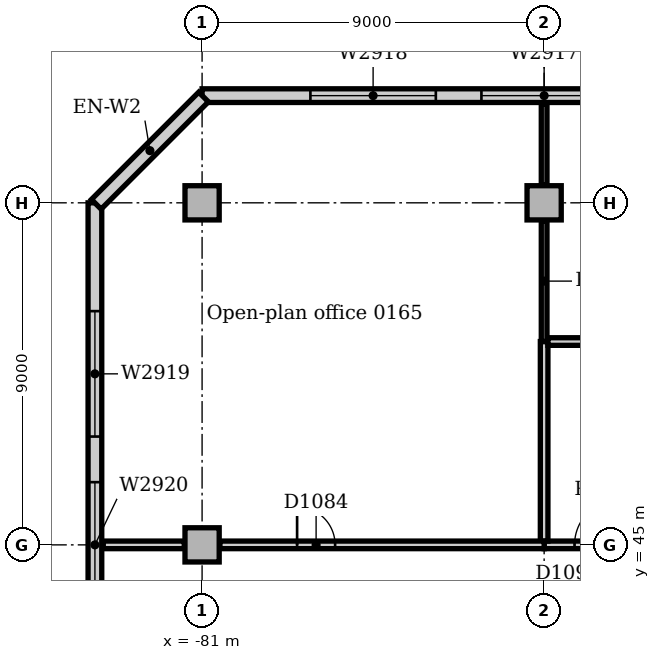
"""IFC4 building model, lengths in metres.
Left out: names, types, materials, properties, quantities, classifications, styles, units other than length and angle.
Written with IfcOpenShell. Run it as: python <this file> out.ifc"""

import sys

from ifc_helpers import new_model, si_unit, direction, frame, frame_2d, origin, origin_2d, place, context, subcontext, project, spatial, rectangle, extrude, element, fill, save


model = new_model("IFC4")
c1 = context("Model", 3, precision=1e-05, world=origin(), true_north=direction((0.0, 1.0)))
c2 = subcontext(c1, "Body", "Model", "MODEL_VIEW")
j1 = project(units=[si_unit("LENGTHUNIT", "METRE"), si_unit("PLANEANGLEUNIT", "RADIAN")], contexts=[c1])
p1 = place(None, origin())
s1 = spatial("IfcSite", under=j1, at=p1, CompositionType="ELEMENT")
p2 = place(p1, origin())
s2 = spatial("IfcBuilding", under=s1, at=p2, CompositionType="ELEMENT")
p3 = place(p2, frame((0.0, 0.0, 6.0)))
s3 = spatial("IfcBuildingStorey", under=s2, at=p3, CompositionType="ELEMENT", Elevation=6.0)
for number, where, z_axis, x_axis in (
    (1, (-81.0, 45.0, 0.0), (0.0, 0.0, 1.0), (1.0, 0.0, 0.0)),
    (2, (-81.0, 54.0, 0.0), (0.0, 0.0, 1.0), (1.0, 0.0, 0.0)),
    (3, (-72.0, 54.0, 0.0), (0.0, 0.0, 1.0), (1.0, 0.0, 0.0)),
):
    element("IfcColumn", number, at=place(p3, frame(where, z_axis=z_axis, x_axis=x_axis)), inside=s3, PredefinedType="COLUMN", context=c2, shape_type="SweptSolid", body=[
        extrude(rectangle(XDim=0.9, YDim=0.9, at=origin_2d()), origin(), (0.0, 0.0, 1.0), 4.7),
    ])
p4 = place(p3, frame((63.0, 56.82, 0.0), z_axis=(0.0, 0.0, 1.0), x_axis=(-1.0, 0.0, 0.0)))
e4 = element("IfcWall", 4, at=p4, inside=s3, PredefinedType="STANDARD", context=c2, shape_type="SweptSolid", body=[
    extrude(rectangle(XDim=144.0, YDim=0.36, at=frame_2d((72.0, 0.0))), origin(), (0.0, 0.0, 1.0), 4.7),
])
p5 = place(p4, frame((2.85, 0.0, 0.9)))
e5 = element("IfcOpeningElement", 5, at=p5, cuts=e4, PredefinedType="OPENING", context=c2, shape_type="SweptSolid", body=[
    extrude(rectangle(XDim=3.3, YDim=2.4, at=frame_2d((1.65, 1.2))), frame((0.0, 0.19, 0.0), z_axis=(0.0, -1.0, 0.0), x_axis=(1.0, 0.0, 0.0)), (0.0, 0.0, 1.0), 0.38),
])
p6 = place(p4, frame((7.35, 0.0, 0.9)))
e6 = element("IfcOpeningElement", 6, at=p6, cuts=e4, PredefinedType="OPENING", context=c2, shape_type="SweptSolid", body=[
    extrude(rectangle(XDim=3.3, YDim=2.4, at=frame_2d((1.65, 1.2))), frame((0.0, 0.19, 0.0), z_axis=(0.0, -1.0, 0.0), x_axis=(1.0, 0.0, 0.0)), (0.0, 0.0, 1.0), 0.38),
])
p7 = place(p4, frame((11.85, 0.0, 0.9)))
e7 = element("IfcOpeningElement", 7, at=p7, cuts=e4, PredefinedType="OPENING", context=c2, shape_type="SweptSolid", body=[
    extrude(rectangle(XDim=3.3, YDim=2.4, at=frame_2d((1.65, 1.2))), frame((0.0, 0.19, 0.0), z_axis=(0.0, -1.0, 0.0), x_axis=(1.0, 0.0, 0.0)), (0.0, 0.0, 1.0), 0.38),
])
p8 = place(p4, frame((16.35, 0.0, 0.9)))
e8 = element("IfcOpeningElement", 8, at=p8, cuts=e4, PredefinedType="OPENING", context=c2, shape_type="SweptSolid", body=[
    extrude(rectangle(XDim=3.3, YDim=2.4, at=frame_2d((1.65, 1.2))), frame((0.0, 0.19, 0.0), z_axis=(0.0, -1.0, 0.0), x_axis=(1.0, 0.0, 0.0)), (0.0, 0.0, 1.0), 0.38),
])
p9 = place(p4, frame((20.85, 0.0, 0.9)))
e9 = element("IfcOpeningElement", 9, at=p9, cuts=e4, PredefinedType="OPENING", context=c2, shape_type="SweptSolid", body=[
    extrude(rectangle(XDim=3.3, YDim=2.4, at=frame_2d((1.65, 1.2))), frame((0.0, 0.19, 0.0), z_axis=(0.0, -1.0, 0.0), x_axis=(1.0, 0.0, 0.0)), (0.0, 0.0, 1.0), 0.38),
])
p10 = place(p4, frame((25.35, 0.0, 0.9)))
e10 = element("IfcOpeningElement", 10, at=p10, cuts=e4, PredefinedType="OPENING", context=c2, shape_type="SweptSolid", body=[
    extrude(rectangle(XDim=3.3, YDim=2.4, at=frame_2d((1.65, 1.2))), frame((0.0, 0.19, 0.0), z_axis=(0.0, -1.0, 0.0), x_axis=(1.0, 0.0, 0.0)), (0.0, 0.0, 1.0), 0.38),
])
p11 = place(p4, frame((29.85, 0.0, 0.9)))
e11 = element("IfcOpeningElement", 11, at=p11, cuts=e4, PredefinedType="OPENING", context=c2, shape_type="SweptSolid", body=[
    extrude(rectangle(XDim=3.3, YDim=2.4, at=frame_2d((1.65, 1.2))), frame((0.0, 0.19, 0.0), z_axis=(0.0, -1.0, 0.0), x_axis=(1.0, 0.0, 0.0)), (0.0, 0.0, 1.0), 0.38),
])
p12 = place(p4, frame((34.35, 0.0, 0.9)))
e12 = element("IfcOpeningElement", 12, at=p12, cuts=e4, PredefinedType="OPENING", context=c2, shape_type="SweptSolid", body=[
    extrude(rectangle(XDim=3.3, YDim=2.4, at=frame_2d((1.65, 1.2))), frame((0.0, 0.19, 0.0), z_axis=(0.0, -1.0, 0.0), x_axis=(1.0, 0.0, 0.0)), (0.0, 0.0, 1.0), 0.38),
])
p13 = place(p4, frame((38.85, 0.0, 0.9)))
e13 = element("IfcOpeningElement", 13, at=p13, cuts=e4, PredefinedType="OPENING", context=c2, shape_type="SweptSolid", body=[
    extrude(rectangle(XDim=3.3, YDim=2.4, at=frame_2d((1.65, 1.2))), frame((0.0, 0.19, 0.0), z_axis=(0.0, -1.0, 0.0), x_axis=(1.0, 0.0, 0.0)), (0.0, 0.0, 1.0), 0.38),
])
p14 = place(p4, frame((43.35, 0.0, 0.9)))
e14 = element("IfcOpeningElement", 14, at=p14, cuts=e4, PredefinedType="OPENING", context=c2, shape_type="SweptSolid", body=[
    extrude(rectangle(XDim=3.3, YDim=2.4, at=frame_2d((1.65, 1.2))), frame((0.0, 0.19, 0.0), z_axis=(0.0, -1.0, 0.0), x_axis=(1.0, 0.0, 0.0)), (0.0, 0.0, 1.0), 0.38),
])
p15 = place(p4, frame((47.85, 0.0, 0.9)))
e15 = element("IfcOpeningElement", 15, at=p15, cuts=e4, PredefinedType="OPENING", context=c2, shape_type="SweptSolid", body=[
    extrude(rectangle(XDim=3.3, YDim=2.4, at=frame_2d((1.65, 1.2))), frame((0.0, 0.19, 0.0), z_axis=(0.0, -1.0, 0.0), x_axis=(1.0, 0.0, 0.0)), (0.0, 0.0, 1.0), 0.38),
])
p16 = place(p4, frame((52.35, 0.0, 0.9)))
e16 = element("IfcOpeningElement", 16, at=p16, cuts=e4, PredefinedType="OPENING", context=c2, shape_type="SweptSolid", body=[
    extrude(rectangle(XDim=3.3, YDim=2.4, at=frame_2d((1.65, 1.2))), frame((0.0, 0.19, 0.0), z_axis=(0.0, -1.0, 0.0), x_axis=(1.0, 0.0, 0.0)), (0.0, 0.0, 1.0), 0.38),
])
p17 = place(p4, frame((56.85, 0.0, 0.9)))
e17 = element("IfcOpeningElement", 17, at=p17, cuts=e4, PredefinedType="OPENING", context=c2, shape_type="SweptSolid", body=[
    extrude(rectangle(XDim=3.3, YDim=2.4, at=frame_2d((1.65, 1.2))), frame((0.0, 0.19, 0.0), z_axis=(0.0, -1.0, 0.0), x_axis=(1.0, 0.0, 0.0)), (0.0, 0.0, 1.0), 0.38),
])
p18 = place(p4, frame((61.35, 0.0, 0.9)))
e18 = element("IfcOpeningElement", 18, at=p18, cuts=e4, PredefinedType="OPENING", context=c2, shape_type="SweptSolid", body=[
    extrude(rectangle(XDim=3.3, YDim=2.4, at=frame_2d((1.65, 1.2))), frame((0.0, 0.19, 0.0), z_axis=(0.0, -1.0, 0.0), x_axis=(1.0, 0.0, 0.0)), (0.0, 0.0, 1.0), 0.38),
])
p19 = place(p4, frame((65.85, 0.0, 0.9)))
e19 = element("IfcOpeningElement", 19, at=p19, cuts=e4, PredefinedType="OPENING", context=c2, shape_type="SweptSolid", body=[
    extrude(rectangle(XDim=3.3, YDim=2.4, at=frame_2d((1.65, 1.2))), frame((0.0, 0.19, 0.0), z_axis=(0.0, -1.0, 0.0), x_axis=(1.0, 0.0, 0.0)), (0.0, 0.0, 1.0), 0.38),
])
p20 = place(p4, frame((70.35, 0.0, 0.9)))
e20 = element("IfcOpeningElement", 20, at=p20, cuts=e4, PredefinedType="OPENING", context=c2, shape_type="SweptSolid", body=[
    extrude(rectangle(XDim=3.3, YDim=2.4, at=frame_2d((1.65, 1.2))), frame((0.0, 0.19, 0.0), z_axis=(0.0, -1.0, 0.0), x_axis=(1.0, 0.0, 0.0)), (0.0, 0.0, 1.0), 0.38),
])
p21 = place(p4, frame((74.85, 0.0, 0.9)))
e21 = element("IfcOpeningElement", 21, at=p21, cuts=e4, PredefinedType="OPENING", context=c2, shape_type="SweptSolid", body=[
    extrude(rectangle(XDim=3.3, YDim=2.4, at=frame_2d((1.65, 1.2))), frame((0.0, 0.19, 0.0), z_axis=(0.0, -1.0, 0.0), x_axis=(1.0, 0.0, 0.0)), (0.0, 0.0, 1.0), 0.38),
])
p22 = place(p4, frame((79.35, 0.0, 0.9)))
e22 = element("IfcOpeningElement", 22, at=p22, cuts=e4, PredefinedType="OPENING", context=c2, shape_type="SweptSolid", body=[
    extrude(rectangle(XDim=3.3, YDim=2.4, at=frame_2d((1.65, 1.2))), frame((0.0, 0.19, 0.0), z_axis=(0.0, -1.0, 0.0), x_axis=(1.0, 0.0, 0.0)), (0.0, 0.0, 1.0), 0.38),
])
p23 = place(p4, frame((83.85, 0.0, 0.9)))
e23 = element("IfcOpeningElement", 23, at=p23, cuts=e4, PredefinedType="OPENING", context=c2, shape_type="SweptSolid", body=[
    extrude(rectangle(XDim=3.3, YDim=2.4, at=frame_2d((1.65, 1.2))), frame((0.0, 0.19, 0.0), z_axis=(0.0, -1.0, 0.0), x_axis=(1.0, 0.0, 0.0)), (0.0, 0.0, 1.0), 0.38),
])
p24 = place(p4, frame((88.35, 0.0, 0.9)))
e24 = element("IfcOpeningElement", 24, at=p24, cuts=e4, PredefinedType="OPENING", context=c2, shape_type="SweptSolid", body=[
    extrude(rectangle(XDim=3.3, YDim=2.4, at=frame_2d((1.65, 1.2))), frame((0.0, 0.19, 0.0), z_axis=(0.0, -1.0, 0.0), x_axis=(1.0, 0.0, 0.0)), (0.0, 0.0, 1.0), 0.38),
])
p25 = place(p4, frame((92.85, 0.0, 0.9)))
e25 = element("IfcOpeningElement", 25, at=p25, cuts=e4, PredefinedType="OPENING", context=c2, shape_type="SweptSolid", body=[
    extrude(rectangle(XDim=3.3, YDim=2.4, at=frame_2d((1.65, 1.2))), frame((0.0, 0.19, 0.0), z_axis=(0.0, -1.0, 0.0), x_axis=(1.0, 0.0, 0.0)), (0.0, 0.0, 1.0), 0.38),
])
p26 = place(p4, frame((97.35, 0.0, 0.9)))
e26 = element("IfcOpeningElement", 26, at=p26, cuts=e4, PredefinedType="OPENING", context=c2, shape_type="SweptSolid", body=[
    extrude(rectangle(XDim=3.3, YDim=2.4, at=frame_2d((1.65, 1.2))), frame((0.0, 0.19, 0.0), z_axis=(0.0, -1.0, 0.0), x_axis=(1.0, 0.0, 0.0)), (0.0, 0.0, 1.0), 0.38),
])
p27 = place(p4, frame((101.85, 0.0, 0.9)))
e27 = element("IfcOpeningElement", 27, at=p27, cuts=e4, PredefinedType="OPENING", context=c2, shape_type="SweptSolid", body=[
    extrude(rectangle(XDim=3.3, YDim=2.4, at=frame_2d((1.65, 1.2))), frame((0.0, 0.19, 0.0), z_axis=(0.0, -1.0, 0.0), x_axis=(1.0, 0.0, 0.0)), (0.0, 0.0, 1.0), 0.38),
])
p28 = place(p4, frame((106.35, 0.0, 0.9)))
e28 = element("IfcOpeningElement", 28, at=p28, cuts=e4, PredefinedType="OPENING", context=c2, shape_type="SweptSolid", body=[
    extrude(rectangle(XDim=3.3, YDim=2.4, at=frame_2d((1.65, 1.2))), frame((0.0, 0.19, 0.0), z_axis=(0.0, -1.0, 0.0), x_axis=(1.0, 0.0, 0.0)), (0.0, 0.0, 1.0), 0.38),
])
p29 = place(p4, frame((110.85, 0.0, 0.9)))
e29 = element("IfcOpeningElement", 29, at=p29, cuts=e4, PredefinedType="OPENING", context=c2, shape_type="SweptSolid", body=[
    extrude(rectangle(XDim=3.3, YDim=2.4, at=frame_2d((1.65, 1.2))), frame((0.0, 0.19, 0.0), z_axis=(0.0, -1.0, 0.0), x_axis=(1.0, 0.0, 0.0)), (0.0, 0.0, 1.0), 0.38),
])
p30 = place(p4, frame((115.35, 0.0, 0.9)))
e30 = element("IfcOpeningElement", 30, at=p30, cuts=e4, PredefinedType="OPENING", context=c2, shape_type="SweptSolid", body=[
    extrude(rectangle(XDim=3.3, YDim=2.4, at=frame_2d((1.65, 1.2))), frame((0.0, 0.19, 0.0), z_axis=(0.0, -1.0, 0.0), x_axis=(1.0, 0.0, 0.0)), (0.0, 0.0, 1.0), 0.38),
])
p31 = place(p4, frame((119.85, 0.0, 0.9)))
e31 = element("IfcOpeningElement", 31, at=p31, cuts=e4, PredefinedType="OPENING", context=c2, shape_type="SweptSolid", body=[
    extrude(rectangle(XDim=3.3, YDim=2.4, at=frame_2d((1.65, 1.2))), frame((0.0, 0.19, 0.0), z_axis=(0.0, -1.0, 0.0), x_axis=(1.0, 0.0, 0.0)), (0.0, 0.0, 1.0), 0.38),
])
p32 = place(p4, frame((124.35, 0.0, 0.9)))
e32 = element("IfcOpeningElement", 32, at=p32, cuts=e4, PredefinedType="OPENING", context=c2, shape_type="SweptSolid", body=[
    extrude(rectangle(XDim=3.3, YDim=2.4, at=frame_2d((1.65, 1.2))), frame((0.0, 0.19, 0.0), z_axis=(0.0, -1.0, 0.0), x_axis=(1.0, 0.0, 0.0)), (0.0, 0.0, 1.0), 0.38),
])
p33 = place(p4, frame((128.85, 0.0, 0.9)))
e33 = element("IfcOpeningElement", 33, at=p33, cuts=e4, PredefinedType="OPENING", context=c2, shape_type="SweptSolid", body=[
    extrude(rectangle(XDim=3.3, YDim=2.4, at=frame_2d((1.65, 1.2))), frame((0.0, 0.19, 0.0), z_axis=(0.0, -1.0, 0.0), x_axis=(1.0, 0.0, 0.0)), (0.0, 0.0, 1.0), 0.38),
])
p34 = place(p4, frame((133.35, 0.0, 0.9)))
e34 = element("IfcOpeningElement", 34, at=p34, cuts=e4, PredefinedType="OPENING", context=c2, shape_type="SweptSolid", body=[
    extrude(rectangle(XDim=3.3, YDim=2.4, at=frame_2d((1.65, 1.2))), frame((0.0, 0.19, 0.0), z_axis=(0.0, -1.0, 0.0), x_axis=(1.0, 0.0, 0.0)), (0.0, 0.0, 1.0), 0.38),
])
p35 = place(p4, frame((137.85, 0.0, 0.9)))
e35 = element("IfcOpeningElement", 35, at=p35, cuts=e4, PredefinedType="OPENING", context=c2, shape_type="SweptSolid", body=[
    extrude(rectangle(XDim=3.3, YDim=2.4, at=frame_2d((1.65, 1.2))), frame((0.0, 0.19, 0.0), z_axis=(0.0, -1.0, 0.0), x_axis=(1.0, 0.0, 0.0)), (0.0, 0.0, 1.0), 0.38),
])
p36 = place(p3, frame((-83.82, 54.0, 0.0), z_axis=(0.0, 0.0, 1.0), x_axis=(0.0, -1.0, 0.0)))
e36 = element("IfcWall", 36, at=p36, inside=s3, PredefinedType="STANDARD", context=c2, shape_type="SweptSolid", body=[
    extrude(rectangle(XDim=63.0, YDim=0.36, at=frame_2d((31.5, 0.0))), origin(), (0.0, 0.0, 1.0), 4.7),
])
p37 = place(p36, frame((2.85, 0.0, 0.9)))
e37 = element("IfcOpeningElement", 37, at=p37, cuts=e36, PredefinedType="OPENING", context=c2, shape_type="SweptSolid", body=[
    extrude(rectangle(XDim=3.3, YDim=2.4, at=frame_2d((1.65, 1.2))), frame((0.0, 0.19, 0.0), z_axis=(0.0, -1.0, 0.0), x_axis=(1.0, 0.0, 0.0)), (0.0, 0.0, 1.0), 0.38),
])
p38 = place(p36, frame((7.35, 0.0, 0.9)))
e38 = element("IfcOpeningElement", 38, at=p38, cuts=e36, PredefinedType="OPENING", context=c2, shape_type="SweptSolid", body=[
    extrude(rectangle(XDim=3.3, YDim=2.4, at=frame_2d((1.65, 1.2))), frame((0.0, 0.19, 0.0), z_axis=(0.0, -1.0, 0.0), x_axis=(1.0, 0.0, 0.0)), (0.0, 0.0, 1.0), 0.38),
])
p39 = place(p36, frame((11.85, 0.0, 0.9)))
e39 = element("IfcOpeningElement", 39, at=p39, cuts=e36, PredefinedType="OPENING", context=c2, shape_type="SweptSolid", body=[
    extrude(rectangle(XDim=3.3, YDim=2.4, at=frame_2d((1.65, 1.2))), frame((0.0, 0.19, 0.0), z_axis=(0.0, -1.0, 0.0), x_axis=(1.0, 0.0, 0.0)), (0.0, 0.0, 1.0), 0.38),
])
p40 = place(p36, frame((16.35, 0.0, 0.9)))
e40 = element("IfcOpeningElement", 40, at=p40, cuts=e36, PredefinedType="OPENING", context=c2, shape_type="SweptSolid", body=[
    extrude(rectangle(XDim=3.3, YDim=2.4, at=frame_2d((1.65, 1.2))), frame((0.0, 0.19, 0.0), z_axis=(0.0, -1.0, 0.0), x_axis=(1.0, 0.0, 0.0)), (0.0, 0.0, 1.0), 0.38),
])
p41 = place(p36, frame((20.85, 0.0, 0.9)))
e41 = element("IfcOpeningElement", 41, at=p41, cuts=e36, PredefinedType="OPENING", context=c2, shape_type="SweptSolid", body=[
    extrude(rectangle(XDim=3.3, YDim=2.4, at=frame_2d((1.65, 1.2))), frame((0.0, 0.19, 0.0), z_axis=(0.0, -1.0, 0.0), x_axis=(1.0, 0.0, 0.0)), (0.0, 0.0, 1.0), 0.38),
])
p42 = place(p36, frame((25.35, 0.0, 0.9)))
e42 = element("IfcOpeningElement", 42, at=p42, cuts=e36, PredefinedType="OPENING", context=c2, shape_type="SweptSolid", body=[
    extrude(rectangle(XDim=3.3, YDim=2.4, at=frame_2d((1.65, 1.2))), frame((0.0, 0.19, 0.0), z_axis=(0.0, -1.0, 0.0), x_axis=(1.0, 0.0, 0.0)), (0.0, 0.0, 1.0), 0.38),
])
p43 = place(p36, frame((29.85, 0.0, 0.9)))
e43 = element("IfcOpeningElement", 43, at=p43, cuts=e36, PredefinedType="OPENING", context=c2, shape_type="SweptSolid", body=[
    extrude(rectangle(XDim=3.3, YDim=2.4, at=frame_2d((1.65, 1.2))), frame((0.0, 0.19, 0.0), z_axis=(0.0, -1.0, 0.0), x_axis=(1.0, 0.0, 0.0)), (0.0, 0.0, 1.0), 0.38),
])
p44 = place(p36, frame((34.35, 0.0, 0.9)))
e44 = element("IfcOpeningElement", 44, at=p44, cuts=e36, PredefinedType="OPENING", context=c2, shape_type="SweptSolid", body=[
    extrude(rectangle(XDim=3.3, YDim=2.4, at=frame_2d((1.65, 1.2))), frame((0.0, 0.19, 0.0), z_axis=(0.0, -1.0, 0.0), x_axis=(1.0, 0.0, 0.0)), (0.0, 0.0, 1.0), 0.38),
])
p45 = place(p36, frame((38.85, 0.0, 0.9)))
e45 = element("IfcOpeningElement", 45, at=p45, cuts=e36, PredefinedType="OPENING", context=c2, shape_type="SweptSolid", body=[
    extrude(rectangle(XDim=3.3, YDim=2.4, at=frame_2d((1.65, 1.2))), frame((0.0, 0.19, 0.0), z_axis=(0.0, -1.0, 0.0), x_axis=(1.0, 0.0, 0.0)), (0.0, 0.0, 1.0), 0.38),
])
p46 = place(p36, frame((43.35, 0.0, 0.9)))
e46 = element("IfcOpeningElement", 46, at=p46, cuts=e36, PredefinedType="OPENING", context=c2, shape_type="SweptSolid", body=[
    extrude(rectangle(XDim=3.3, YDim=2.4, at=frame_2d((1.65, 1.2))), frame((0.0, 0.19, 0.0), z_axis=(0.0, -1.0, 0.0), x_axis=(1.0, 0.0, 0.0)), (0.0, 0.0, 1.0), 0.38),
])
p47 = place(p36, frame((47.85, 0.0, 0.9)))
e47 = element("IfcOpeningElement", 47, at=p47, cuts=e36, PredefinedType="OPENING", context=c2, shape_type="SweptSolid", body=[
    extrude(rectangle(XDim=3.3, YDim=2.4, at=frame_2d((1.65, 1.2))), frame((0.0, 0.19, 0.0), z_axis=(0.0, -1.0, 0.0), x_axis=(1.0, 0.0, 0.0)), (0.0, 0.0, 1.0), 0.38),
])
p48 = place(p36, frame((52.35, 0.0, 0.9)))
e48 = element("IfcOpeningElement", 48, at=p48, cuts=e36, PredefinedType="OPENING", context=c2, shape_type="SweptSolid", body=[
    extrude(rectangle(XDim=3.3, YDim=2.4, at=frame_2d((1.65, 1.2))), frame((0.0, 0.19, 0.0), z_axis=(0.0, -1.0, 0.0), x_axis=(1.0, 0.0, 0.0)), (0.0, 0.0, 1.0), 0.38),
])
p49 = place(p36, frame((56.85, 0.0, 0.9)))
e49 = element("IfcOpeningElement", 49, at=p49, cuts=e36, PredefinedType="OPENING", context=c2, shape_type="SweptSolid", body=[
    extrude(rectangle(XDim=3.3, YDim=2.4, at=frame_2d((1.65, 1.2))), frame((0.0, 0.19, 0.0), z_axis=(0.0, -1.0, 0.0), x_axis=(1.0, 0.0, 0.0)), (0.0, 0.0, 1.0), 0.38),
])
p50 = place(p3, frame((-80.961, 56.784, 0.0), z_axis=(0.0, 0.0, 1.0), x_axis=(-0.707106781187, -0.707106781187, 0.0)))
e50 = element("IfcWall", 50, at=p50, inside=s3, PredefinedType="STANDARD", context=c2, shape_type="SweptSolid", body=[
    extrude(rectangle(XDim=3.993, YDim=0.36, at=frame_2d((1.996, 0.0))), origin(), (0.0, 0.0, 1.0), 4.7),
])
p51 = place(p3, frame((-72.0, 45.0, 0.0), z_axis=(0.0, 0.0, 1.0), x_axis=(1.0, 0.0, 0.0)))
e51 = element("IfcWall", 51, at=p51, inside=s3, PredefinedType="SOLIDWALL", context=c2, shape_type="SweptSolid", body=[
    extrude(rectangle(XDim=9.0, YDim=0.2, at=frame_2d((4.5, 0.0))), origin(), (0.0, 0.0, 1.0), 4.7),
])
p52 = place(p51, frame((0.8, 0.0, 0.0)))
e52 = element("IfcOpeningElement", 52, at=p52, cuts=e51, PredefinedType="OPENING", context=c2, shape_type="SweptSolid", body=[
    extrude(rectangle(XDim=1.2, YDim=2.1, at=frame_2d((0.6, 1.05))), frame((0.0, 0.11, 0.0), z_axis=(0.0, -1.0, 0.0), x_axis=(1.0, 0.0, 0.0)), (0.0, 0.0, 1.0), 0.22),
])
p53 = place(p3, frame((-72.0, 45.1, 0.0), z_axis=(0.0, 0.0, 1.0), x_axis=(0.0, 1.0, 0.0)))
e53 = element("IfcWall", 53, at=p53, inside=s3, PredefinedType="SOLIDWALL", context=c2, shape_type="SweptSolid", body=[
    extrude(rectangle(XDim=5.25, YDim=0.2, at=frame_2d((2.625, 0.0))), origin(), (0.0, 0.0, 1.0), 4.7),
])
p54 = place(p3, frame((-71.9, 50.35, 0.0), z_axis=(0.0, 0.0, 1.0), x_axis=(1.0, 0.0, 0.0)))
e54 = element("IfcWall", 54, at=p54, inside=s3, PredefinedType="SOLIDWALL", context=c2, shape_type="SweptSolid", body=[
    extrude(rectangle(XDim=9.0, YDim=0.2, at=frame_2d((4.5, 0.0))), origin(), (0.0, 0.0, 1.0), 4.7),
])
p55 = place(p3, frame((-83.6, 45.0, 0.0), z_axis=(0.0, 0.0, 1.0), x_axis=(1.0, 0.0, 0.0)))
e55 = element("IfcWall", 55, at=p55, inside=s3, PredefinedType="PARTITIONING", context=c2, shape_type="SweptSolid", body=[
    extrude(rectangle(XDim=2.13, YDim=0.2, at=frame_2d((1.065, 0.0))), origin(), (0.0, 0.0, 1.0), 4.7),
])
p56 = place(p3, frame((-80.53, 45.0, 0.0), z_axis=(0.0, 0.0, 1.0), x_axis=(1.0, 0.0, 0.0)))
e56 = element("IfcWall", 56, at=p56, inside=s3, PredefinedType="PARTITIONING", context=c2, shape_type="SweptSolid", body=[
    extrude(rectangle(XDim=8.53, YDim=0.2, at=frame_2d((4.265, 0.0))), origin(), (0.0, 0.0, 1.0), 4.7),
])
p57 = place(p56, frame((2.03, 0.0, 0.0)))
e57 = element("IfcOpeningElement", 57, at=p57, cuts=e56, PredefinedType="OPENING", context=c2, shape_type="SweptSolid", body=[
    extrude(rectangle(XDim=1.0, YDim=2.1, at=frame_2d((0.5, 1.05))), frame((0.0, 0.11, 0.0), z_axis=(0.0, -1.0, 0.0), x_axis=(1.0, 0.0, 0.0)), (0.0, 0.0, 1.0), 0.22),
])
p58 = place(p3, frame((-72.0, 50.35, 0.0), z_axis=(0.0, 0.0, 1.0), x_axis=(0.0, 1.0, 0.0)))
e58 = element("IfcWall", 58, at=p58, inside=s3, PredefinedType="PARTITIONING", context=c2, shape_type="SweptSolid", body=[
    extrude(rectangle(XDim=3.18, YDim=0.15, at=frame_2d((1.59, 0.0))), origin(), (0.0, 0.0, 1.0), 4.7),
])
p59 = place(p3, frame((-72.0, 54.47, 0.0), z_axis=(0.0, 0.0, 1.0), x_axis=(0.0, 1.0, 0.0)))
e59 = element("IfcWall", 59, at=p59, inside=s3, PredefinedType="PARTITIONING", context=c2, shape_type="SweptSolid", body=[
    extrude(rectangle(XDim=2.13, YDim=0.15, at=frame_2d((1.065, 0.0))), origin(), (0.0, 0.0, 1.0), 4.7),
])
p60 = place(p34, origin())
e60 = element("IfcWindow", 60, at=p60, inside=s3, PartitioningType="SINGLE_PANEL", PredefinedType="WINDOW", context=c2, shape_type="SweptSolid", body=[
    extrude(rectangle(XDim=3.3, YDim=2.4, at=frame_2d((1.65, 1.2))), frame((0.0, 0.13, 0.0), z_axis=(0.0, -1.0, 0.0), x_axis=(1.0, 0.0, 0.0)), (0.0, 0.0, 1.0), 0.06),
])
fill(e34, e60)
p61 = place(p35, origin())
e61 = element("IfcWindow", 61, at=p61, inside=s3, PartitioningType="SINGLE_PANEL", PredefinedType="WINDOW", context=c2, shape_type="SweptSolid", body=[
    extrude(rectangle(XDim=3.3, YDim=2.4, at=frame_2d((1.65, 1.2))), frame((0.0, 0.13, 0.0), z_axis=(0.0, -1.0, 0.0), x_axis=(1.0, 0.0, 0.0)), (0.0, 0.0, 1.0), 0.06),
])
fill(e35, e61)
p62 = place(p37, origin())
e62 = element("IfcWindow", 62, at=p62, inside=s3, PartitioningType="SINGLE_PANEL", PredefinedType="WINDOW", context=c2, shape_type="SweptSolid", body=[
    extrude(rectangle(XDim=3.3, YDim=2.4, at=frame_2d((1.65, 1.2))), frame((0.0, 0.13, 0.0), z_axis=(0.0, -1.0, 0.0), x_axis=(1.0, 0.0, 0.0)), (0.0, 0.0, 1.0), 0.06),
])
fill(e37, e62)
p63 = place(p38, origin())
e63 = element("IfcWindow", 63, at=p63, inside=s3, PartitioningType="SINGLE_PANEL", PredefinedType="WINDOW", context=c2, shape_type="SweptSolid", body=[
    extrude(rectangle(XDim=3.3, YDim=2.4, at=frame_2d((1.65, 1.2))), frame((0.0, 0.13, 0.0), z_axis=(0.0, -1.0, 0.0), x_axis=(1.0, 0.0, 0.0)), (0.0, 0.0, 1.0), 0.06),
])
fill(e38, e63)
p64 = place(p57, origin())
e64 = element("IfcDoor", 64, at=p64, inside=s3, OperationType="SINGLE_SWING_LEFT", PredefinedType="DOOR", context=c2, shape_type="SweptSolid", body=[
    extrude(rectangle(XDim=1.0, YDim=2.1, at=frame_2d((0.5, 1.05))), frame((0.0, 0.025, 0.0), z_axis=(0.0, -1.0, 0.0), x_axis=(1.0, 0.0, 0.0)), (0.0, 0.0, 1.0), 0.05),
])
fill(e57, e64)
p65 = place(p52, origin())
e65 = element("IfcDoor", 65, at=p65, inside=s3, OperationType="SINGLE_SWING_RIGHT", PredefinedType="DOOR", context=c2, shape_type="SweptSolid", body=[
    extrude(rectangle(XDim=1.2, YDim=2.1, at=frame_2d((0.6, 1.05))), frame((0.0, 0.025, 0.0), z_axis=(0.0, -1.0, 0.0), x_axis=(1.0, 0.0, 0.0)), (0.0, 0.0, 1.0), 0.05),
])
fill(e52, e65)
save(model, sys.argv[1])
